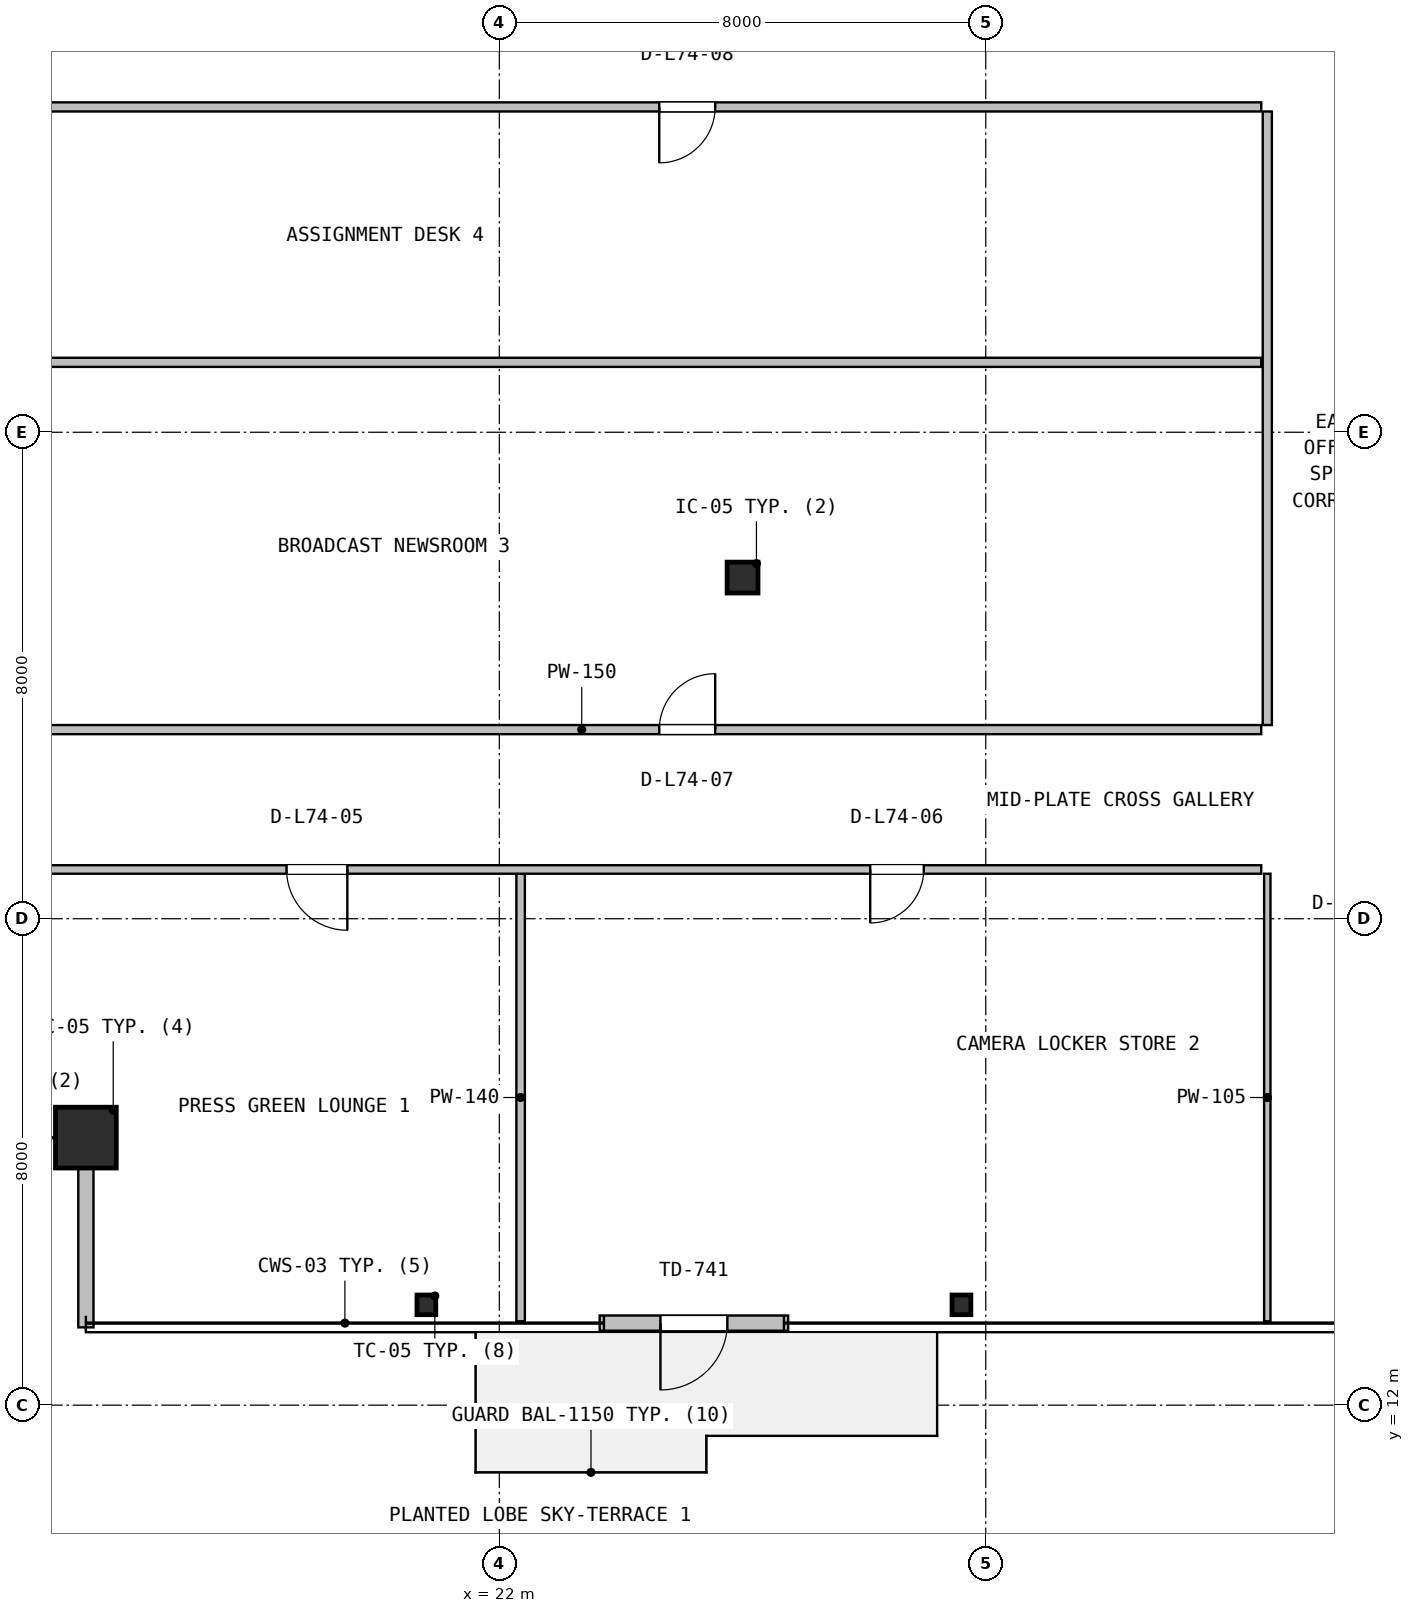
"""IFC4 building model, lengths in metres.
Left out: names, types, materials, properties, quantities, classifications, styles, units other than length and angle.
Written with IfcOpenShell. Run it as: python <this file> out.ifc"""

import sys

from ifc_helpers import new_model, si_unit, direction, frame, frame_2d, origin, origin_2d, place, context, subcontext, project, spatial, rectangle, hollow_rectangle, hollow_circle, i_section, extrude, source, transform, mapped, element, fill, save


model = new_model("IFC4")
c1 = context("Model", 3, precision=1e-05, world=origin(), true_north=direction((0.0, 1.0)))
c2 = subcontext(c1, "Body", "Model", "MODEL_VIEW")
j1 = project(units=[si_unit("LENGTHUNIT", "METRE"), si_unit("PLANEANGLEUNIT", "RADIAN")], contexts=[c1])
p1 = place(None, origin())
s1 = spatial("IfcSite", under=j1, at=p1, CompositionType="ELEMENT")
p2 = place(p1, origin())
s2 = spatial("IfcBuilding", under=s1, at=p2, CompositionType="ELEMENT")
p3 = place(p2, frame((0.0, 0.0, 296.4)))
s3 = spatial("IfcBuildingStorey", under=s2, at=p3, CompositionType="ELEMENT", Elevation=296.4)
m1 = source(origin(), c2, "Body", "SweptSolid", [
    extrude(hollow_rectangle(XDim=1.0, YDim=1.0, WallThickness=0.04, at=origin_2d()), origin(), (0.0, 0.0, 1.0), 3.8),
])
p4 = place(p3, frame((15.2, 16.4, 0.0), z_axis=(0.0, 0.0, 1.0), x_axis=(1.0, 0.0, 0.0)))
e1 = element("IfcColumn", 1, at=p4, inside=s3, PredefinedType="COLUMN", context=c2, shape_type="MappedRepresentation", body=[
    mapped(m1, transform((0.0, 0.0, 0.0), x_axis=(1.0, 0.0, 0.0), y_axis=(0.0, 1.0, 0.0), z_axis=(0.0, 0.0, 1.0), scale=1.0)),
])
m2 = source(origin(), c2, "Body", "SweptSolid", [
    extrude(i_section(OverallWidth=0.309, OverallDepth=0.323, WebThickness=0.014, FlangeThickness=0.023, FilletRadius=0.015, at=origin_2d()), origin(), (0.0, 0.0, 1.0), 3.8),
])
for number, where, z_axis, x_axis in (
    (2, (20.8, 13.65, 0.0), (0.0, 0.0, 1.0), (1.0, 0.0, 0.0)),
    (3, (29.6, 13.65, 0.0), (0.0, 0.0, 1.0), (1.0, 0.0, 0.0)),
):
    element("IfcColumn", number, at=place(p3, frame(where, z_axis=z_axis, x_axis=x_axis)), inside=s3, PredefinedType="COLUMN", context=c2, shape_type="MappedRepresentation", body=[
        mapped(m2, transform((0.0, 0.0, 0.0), x_axis=(1.0, 0.0, 0.0), y_axis=(0.0, 1.0, 0.0), z_axis=(0.0, 0.0, 1.0), scale=1.0)),
    ])
m3 = source(origin(), c2, "Body", "SweptSolid", [
    extrude(hollow_circle(Radius=0.254, WallThickness=0.02, at=origin_2d()), origin(), (0.0, 0.0, 1.0), 3.8),
])
p5 = place(p3, frame((26.0, 25.61, 0.0), z_axis=(0.0, 0.0, 1.0), x_axis=(1.0, 0.0, 0.0)))
e4 = element("IfcColumn", 4, at=p5, inside=s3, PredefinedType="COLUMN", context=c2, shape_type="MappedRepresentation", body=[
    mapped(m3, transform((0.0, 0.0, 0.0), x_axis=(1.0, 0.0, 0.0), y_axis=(0.0, 1.0, 0.0), z_axis=(0.0, 0.0, 1.0), scale=1.0)),
])
p6 = place(p3, frame((23.65, 13.35, 0.0), z_axis=(0.0, 0.0, 1.0), x_axis=(1.0, 0.0, 0.0)))
e5 = element("IfcWall", 5, at=p6, inside=s3, PredefinedType="SOLIDWALL", context=c2, shape_type="SweptSolid", body=[
    extrude(rectangle(XDim=3.1, YDim=0.25, at=frame_2d((1.55, 0.0))), origin(), (0.0, 0.0, 1.0), 3.5),
])
p7 = place(p6, frame((1.0, 0.0, 0.0)))
e6 = element("IfcOpeningElement", 6, at=p7, cuts=e5, PredefinedType="OPENING", context=c2, shape_type="SweptSolid", body=[
    extrude(rectangle(XDim=1.1, YDim=2.15, at=frame_2d((0.55, 1.075))), frame((0.0, 0.135, 0.0), z_axis=(0.0, -1.0, 0.0), x_axis=(1.0, 0.0, 0.0)), (0.0, 0.0, 1.0), 0.27),
])
p8 = place(p3, frame((15.2, 13.28, 0.0), z_axis=(0.0, 0.0, 1.0), x_axis=(0.0, 1.0, 0.0)))
e7 = element("IfcWall", 7, at=p8, inside=s3, PredefinedType="SOLIDWALL", context=c2, shape_type="SweptSolid", body=[
    extrude(rectangle(XDim=3.2, YDim=0.25, at=frame_2d((1.6, 0.0))), origin(), (0.0, 0.0, 1.0), 3.141),
])
p9 = place(p3, frame((22.35, 13.38, 0.0), z_axis=(0.0, 0.0, 1.0), x_axis=(0.0, 1.0, 0.0)))
e8 = element("IfcWall", 8, at=p9, inside=s3, PredefinedType="PARTITIONING", context=c2, shape_type="SweptSolid", body=[
    extrude(rectangle(XDim=7.36, YDim=0.14, at=frame_2d((3.68, 0.0))), origin(), (0.0, 0.0, 1.0), 3.141),
])
p10 = place(p3, frame((12.18, 20.81, 0.0), z_axis=(0.0, 0.0, 1.0), x_axis=(1.0, 0.0, 0.0)))
e9 = element("IfcWall", 9, at=p10, inside=s3, PredefinedType="PARTITIONING", context=c2, shape_type="SweptSolid", body=[
    extrude(rectangle(XDim=22.35, YDim=0.14, at=frame_2d((11.175, 0.0))), origin(), (0.0, 0.0, 1.0), 2.951),
])
p11 = place(p10, frame((6.32, 0.0, 0.0)))
e10 = element("IfcOpeningElement", 10, at=p11, cuts=e9, PredefinedType="OPENING", context=c2, shape_type="SweptSolid", body=[
    extrude(rectangle(XDim=1.0, YDim=2.1, at=frame_2d((0.5, 1.05))), frame((0.0, 0.08, 0.0), z_axis=(0.0, -1.0, 0.0), x_axis=(1.0, 0.0, 0.0)), (0.0, 0.0, 1.0), 0.16),
])
p12 = place(p10, frame((15.92, 0.0, 0.0)))
e11 = element("IfcOpeningElement", 11, at=p12, cuts=e9, PredefinedType="OPENING", context=c2, shape_type="SweptSolid", body=[
    extrude(rectangle(XDim=0.88, YDim=2.06, at=frame_2d((0.44, 1.03))), frame((0.0, 0.08, 0.0), z_axis=(0.0, -1.0, 0.0), x_axis=(1.0, 0.0, 0.0)), (0.0, 0.0, 1.0), 0.16),
])
p13 = place(p3, frame((34.63, 13.38, 0.0), z_axis=(0.0, 0.0, 1.0), x_axis=(0.0, 1.0, 0.0)))
e12 = element("IfcWall", 12, at=p13, inside=s3, PredefinedType="PARTITIONING", context=c2, shape_type="SweptSolid", body=[
    extrude(rectangle(XDim=7.36, YDim=0.105, at=frame_2d((3.68, 0.0))), origin(), (0.0, 0.0, 1.0), 3.141),
])
p14 = place(p3, frame((12.18, 23.11, 0.0), z_axis=(0.0, 0.0, 1.0), x_axis=(1.0, 0.0, 0.0)))
e13 = element("IfcWall", 13, at=p14, inside=s3, PredefinedType="PARTITIONING", context=c2, shape_type="SweptSolid", body=[
    extrude(rectangle(XDim=22.35, YDim=0.15, at=frame_2d((11.175, 0.0))), origin(), (0.0, 0.0, 1.0), 2.951),
])
p15 = place(p14, frame((12.45, 0.0, 0.0)))
e14 = element("IfcOpeningElement", 14, at=p15, cuts=e13, PredefinedType="OPENING", context=c2, shape_type="SweptSolid", body=[
    extrude(rectangle(XDim=0.92, YDim=2.08, at=frame_2d((0.46, 1.04))), frame((0.0, 0.085, 0.0), z_axis=(0.0, -1.0, 0.0), x_axis=(1.0, 0.0, 0.0)), (0.0, 0.0, 1.0), 0.17),
])
p16 = place(p3, frame((34.63, 23.185, 0.0), z_axis=(0.0, 0.0, 1.0), x_axis=(0.0, 1.0, 0.0)))
e15 = element("IfcWall", 15, at=p16, inside=s3, PredefinedType="PARTITIONING", context=c2, shape_type="SweptSolid", body=[
    extrude(rectangle(XDim=10.09, YDim=0.15, at=frame_2d((5.045, 0.0))), origin(), (0.0, 0.0, 1.0), 1.895),
])
p17 = place(p3, frame((12.18, 29.15, 0.0), z_axis=(0.0, 0.0, 1.0), x_axis=(1.0, 0.0, 0.0)))
e16 = element("IfcWall", 16, at=p17, inside=s3, PredefinedType="PARTITIONING", context=c2, shape_type="SweptSolid", body=[
    extrude(rectangle(XDim=22.35, YDim=0.15, at=frame_2d((11.175, 0.0))), origin(), (0.0, 0.0, 1.0), 2.165),
])
p18 = place(p3, frame((12.18, 33.35, 0.0), z_axis=(0.0, 0.0, 1.0), x_axis=(1.0, 0.0, 0.0)))
e17 = element("IfcWall", 17, at=p18, inside=s3, PredefinedType="PARTITIONING", context=c2, shape_type="SweptSolid", body=[
    extrude(rectangle(XDim=22.35, YDim=0.15, at=frame_2d((11.175, 0.0))), origin(), (0.0, 0.0, 1.0), 2.165),
])
p19 = place(p18, frame((12.45, 0.0, 0.0)))
e18 = element("IfcOpeningElement", 18, at=p19, cuts=e17, PredefinedType="OPENING", context=c2, shape_type="SweptSolid", body=[
    extrude(rectangle(XDim=0.92, YDim=2.08, at=frame_2d((0.46, 1.04))), frame((0.0, 0.085, 0.0), z_axis=(0.0, -1.0, 0.0), x_axis=(1.0, 0.0, 0.0)), (0.0, 0.0, 1.0), 0.17),
])
m4 = source(origin(), c2, "Body", "SweptSolid", [
    extrude(rectangle(XDim=1.1, YDim=2.15, at=frame_2d((0.55, 1.075))), frame((0.0, 0.025, 0.0), z_axis=(0.0, -1.0, 0.0), x_axis=(1.0, 0.0, 0.0)), (0.0, 0.0, 1.0), 0.05),
])
p20 = place(p7, frame((1.1, 0.0, 0.0), z_axis=(0.0, 0.0, 1.0), x_axis=(-1.0, 0.0, 0.0)))
e19 = element("IfcDoor", 19, at=p20, inside=s3, OperationType="SINGLE_SWING_LEFT", PredefinedType="DOOR", context=c2, shape_type="MappedRepresentation", body=[
    mapped(m4, transform((0.0, 0.0, 0.0), x_axis=(1.0, 0.0, 0.0), y_axis=(0.0, 1.0, 0.0), z_axis=(0.0, 0.0, 1.0), scale=1.0)),
])
fill(e6, e19)
m5 = source(origin(), c2, "Body", "SweptSolid", [
    extrude(rectangle(XDim=1.0, YDim=2.1, at=frame_2d((0.5, 1.05))), frame((0.0, 0.025, 0.0), z_axis=(0.0, -1.0, 0.0), x_axis=(1.0, 0.0, 0.0)), (0.0, 0.0, 1.0), 0.05),
])
p21 = place(p11, frame((1.0, 0.0, 0.0), z_axis=(0.0, 0.0, 1.0), x_axis=(-1.0, 0.0, 0.0)))
e20 = element("IfcDoor", 20, at=p21, inside=s3, OperationType="SINGLE_SWING_RIGHT", PredefinedType="DOOR", context=c2, shape_type="MappedRepresentation", body=[
    mapped(m5, transform((0.0, 0.0, 0.0), x_axis=(1.0, 0.0, 0.0), y_axis=(0.0, 1.0, 0.0), z_axis=(0.0, 0.0, 1.0), scale=1.0)),
])
fill(e10, e20)
m6 = source(origin(), c2, "Body", "SweptSolid", [
    extrude(rectangle(XDim=0.88, YDim=2.06, at=frame_2d((0.44, 1.03))), frame((0.0, 0.025, 0.0), z_axis=(0.0, -1.0, 0.0), x_axis=(1.0, 0.0, 0.0)), (0.0, 0.0, 1.0), 0.05),
])
p22 = place(p12, frame((0.88, 0.0, 0.0), z_axis=(0.0, 0.0, 1.0), x_axis=(-1.0, 0.0, 0.0)))
e21 = element("IfcDoor", 21, at=p22, inside=s3, OperationType="SINGLE_SWING_LEFT", PredefinedType="DOOR", context=c2, shape_type="MappedRepresentation", body=[
    mapped(m6, transform((0.0, 0.0, 0.0), x_axis=(1.0, 0.0, 0.0), y_axis=(0.0, 1.0, 0.0), z_axis=(0.0, 0.0, 1.0), scale=1.0)),
])
fill(e11, e21)
m7 = source(origin(), c2, "Body", "SweptSolid", [
    extrude(rectangle(XDim=0.92, YDim=2.08, at=frame_2d((0.46, 1.04))), frame((0.0, 0.025, 0.0), z_axis=(0.0, -1.0, 0.0), x_axis=(1.0, 0.0, 0.0)), (0.0, 0.0, 1.0), 0.05),
])
p23 = place(p15, origin())
e22 = element("IfcDoor", 22, at=p23, inside=s3, OperationType="SINGLE_SWING_RIGHT", PredefinedType="DOOR", context=c2, shape_type="MappedRepresentation", body=[
    mapped(m7, transform((0.0, 0.0, 0.0), x_axis=(1.0, 0.0, 0.0), y_axis=(0.0, 1.0, 0.0), z_axis=(0.0, 0.0, 1.0), scale=1.0)),
])
fill(e14, e22)
p24 = place(p19, frame((0.92, 0.0, 0.0), z_axis=(0.0, 0.0, 1.0), x_axis=(-1.0, 0.0, 0.0)))
e23 = element("IfcDoor", 23, at=p24, inside=s3, OperationType="SINGLE_SWING_LEFT", PredefinedType="DOOR", context=c2, shape_type="MappedRepresentation", body=[
    mapped(m7, transform((0.0, 0.0, 0.0), x_axis=(1.0, 0.0, 0.0), y_axis=(0.0, 1.0, 0.0), z_axis=(0.0, 0.0, 1.0), scale=1.0)),
])
fill(e18, e23)
save(model, sys.argv[1])
